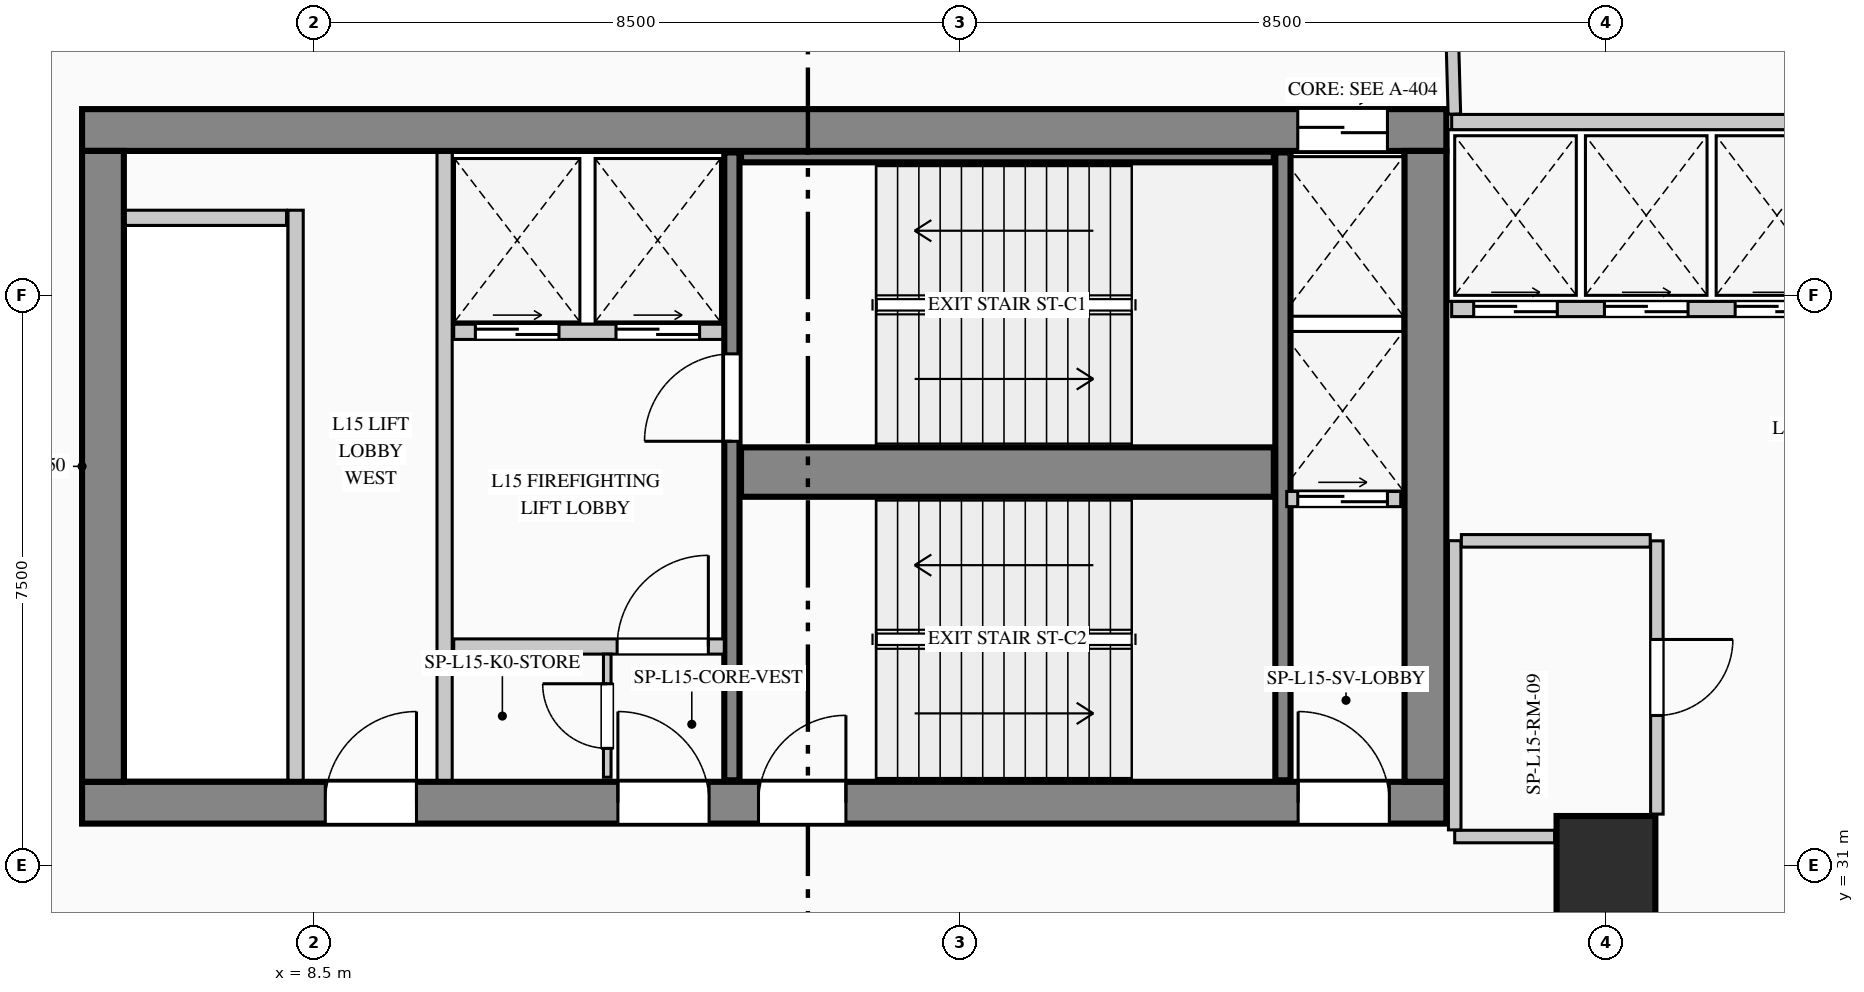
"""IFC4 building model, lengths in metres.
Left out: names, types, materials, properties, quantities, classifications, styles, units other than length and angle.
Written with IfcOpenShell. Run it as: python <this file> out.ifc"""

import sys

from ifc_helpers import new_model, si_unit, direction, frame, frame_2d, origin, origin_2d, place, context, subcontext, project, spatial, rectangle, extrude, element, fill, save


model = new_model("IFC4")
c1 = context("Model", 3, precision=1e-05, world=origin(), true_north=direction((0.0, 1.0)))
c2 = subcontext(c1, "Body", "Model", "MODEL_VIEW")
j1 = project(units=[si_unit("LENGTHUNIT", "METRE"), si_unit("PLANEANGLEUNIT", "RADIAN")], contexts=[c1])
p1 = place(None, origin())
s1 = spatial("IfcSite", under=j1, at=p1, CompositionType="ELEMENT")
p2 = place(p1, origin())
s2 = spatial("IfcBuilding", under=s1, at=p2, CompositionType="ELEMENT")
p3 = place(p2, frame((0.0, 0.0, 66.6)))
s3 = spatial("IfcBuildingStorey", under=s2, at=p3, CompositionType="ELEMENT", Elevation=66.6)
p4 = place(p3, frame((5.45, 40.675, 0.0), z_axis=(0.0, 0.0, 1.0), x_axis=(1.0, 0.0, 0.0)))
e1 = element("IfcWall", 1, at=p4, inside=s3, PredefinedType="SHEAR", context=c2, shape_type="SweptSolid", body=[
    extrude(rectangle(XDim=17.95, YDim=0.55, at=frame_2d((8.975, 0.0))), origin(), (0.0, 0.0, 1.0), 4.4),
])
p5 = place(p4, frame((15.995, 0.0, 0.0)))
e2 = element("IfcOpeningElement", 2, at=p5, cuts=e1, PredefinedType="OPENING", context=c2, shape_type="SweptSolid", body=[
    extrude(rectangle(XDim=1.18, YDim=2.25, at=frame_2d((0.59, 1.125))), frame((0.0, 0.285, 0.0), z_axis=(0.0, -1.0, 0.0), x_axis=(1.0, 0.0, 0.0)), (0.0, 0.0, 1.0), 0.57),
])
p6 = place(p3, frame((5.45, 31.825, 0.0), z_axis=(0.0, 0.0, 1.0), x_axis=(1.0, 0.0, 0.0)))
e3 = element("IfcWall", 3, at=p6, inside=s3, PredefinedType="SHEAR", context=c2, shape_type="SweptSolid", body=[
    extrude(rectangle(XDim=17.95, YDim=0.55, at=frame_2d((8.975, 0.0))), origin(), (0.0, 0.0, 1.0), 4.4),
])
p7 = place(p6, frame((3.2, 0.0, 0.0)))
e4 = element("IfcOpeningElement", 4, at=p7, cuts=e3, PredefinedType="OPENING", context=c2, shape_type="SweptSolid", body=[
    extrude(rectangle(XDim=1.2, YDim=2.2, at=frame_2d((0.6, 1.1))), frame((0.0, 0.285, 0.0), z_axis=(0.0, -1.0, 0.0), x_axis=(1.0, 0.0, 0.0)), (0.0, 0.0, 1.0), 0.57),
])
p8 = place(p6, frame((7.05, 0.0, 0.0)))
e5 = element("IfcOpeningElement", 5, at=p8, cuts=e3, PredefinedType="OPENING", context=c2, shape_type="SweptSolid", body=[
    extrude(rectangle(XDim=1.2, YDim=2.2, at=frame_2d((0.6, 1.1))), frame((0.0, 0.285, 0.0), z_axis=(0.0, -1.0, 0.0), x_axis=(1.0, 0.0, 0.0)), (0.0, 0.0, 1.0), 0.57),
])
p9 = place(p6, frame((8.9, 0.0, 0.0)))
e6 = element("IfcOpeningElement", 6, at=p9, cuts=e3, PredefinedType="OPENING", context=c2, shape_type="SweptSolid", body=[
    extrude(rectangle(XDim=1.15, YDim=2.2, at=frame_2d((0.575, 1.1))), frame((0.0, 0.285, 0.0), z_axis=(0.0, -1.0, 0.0), x_axis=(1.0, 0.0, 0.0)), (0.0, 0.0, 1.0), 0.57),
])
p10 = place(p6, frame((16.0, 0.0, 0.0)))
e7 = element("IfcOpeningElement", 7, at=p10, cuts=e3, PredefinedType="OPENING", context=c2, shape_type="SweptSolid", body=[
    extrude(rectangle(XDim=1.2, YDim=2.2, at=frame_2d((0.6, 1.1))), frame((0.0, 0.285, 0.0), z_axis=(0.0, -1.0, 0.0), x_axis=(1.0, 0.0, 0.0)), (0.0, 0.0, 1.0), 0.57),
])
for number, where, z_axis, x_axis in (
    (8, (5.725, 32.1, 0.0), (0.0, 0.0, 1.0), (0.0, 1.0, 0.0)),
    (9, (23.125, 32.1, 0.0), (0.0, 0.0, 1.0), (0.0, 1.0, 0.0)),
):
    element("IfcWall", number, at=place(p3, frame(where, z_axis=z_axis, x_axis=x_axis)), inside=s3, PredefinedType="SHEAR", context=c2, shape_type="SweptSolid", body=[
        extrude(rectangle(XDim=8.3, YDim=0.55, at=frame_2d((4.15, 0.0))), origin(), (0.0, 0.0, 1.0), 4.4),
    ])
p11 = place(p3, frame((14.0, 32.12, 0.0), z_axis=(0.0, 0.0, 1.0), x_axis=(0.0, 1.0, 0.0)))
e10 = element("IfcWall", 10, at=p11, inside=s3, PredefinedType="SHEAR", context=c2, shape_type="SweptSolid", body=[
    extrude(rectangle(XDim=8.26, YDim=0.2, at=frame_2d((4.13, 0.0))), origin(), (0.0, 0.0, 1.0), 4.4),
])
p12 = place(p11, frame((4.46, 0.0, 0.0)))
e11 = element("IfcOpeningElement", 11, at=p12, cuts=e10, PredefinedType="OPENING", context=c2, shape_type="SweptSolid", body=[
    extrude(rectangle(XDim=1.15, YDim=2.2, at=frame_2d((0.575, 1.1))), frame((0.0, 0.11, 0.0), z_axis=(0.0, -1.0, 0.0), x_axis=(1.0, 0.0, 0.0)), (0.0, 0.0, 1.0), 0.22),
])
p13 = place(p3, frame((14.12, 36.175, 0.0), z_axis=(0.0, 0.0, 1.0), x_axis=(1.0, 0.0, 0.0)))
e12 = element("IfcWall", 12, at=p13, inside=s3, PredefinedType="SHEAR", context=c2, shape_type="SweptSolid", body=[
    extrude(rectangle(XDim=7.01, YDim=0.65, at=frame_2d((3.505, 0.0))), origin(), (0.0, 0.0, 1.0), 4.4),
])
p14 = place(p3, frame((21.25, 32.12, 0.0), z_axis=(0.0, 0.0, 1.0), x_axis=(0.0, 1.0, 0.0)))
e13 = element("IfcWall", 13, at=p14, inside=s3, PredefinedType="SHEAR", context=c2, shape_type="SweptSolid", body=[
    extrude(rectangle(XDim=8.26, YDim=0.2, at=frame_2d((4.13, 0.0))), origin(), (0.0, 0.0, 1.0), 4.4),
])
p15 = place(p3, frame((14.12, 40.32, 0.0), z_axis=(0.0, 0.0, 1.0), x_axis=(1.0, 0.0, 0.0)))
e14 = element("IfcWall", 14, at=p15, inside=s3, PredefinedType="SHEAR", context=c2, shape_type="SweptSolid", body=[
    extrude(rectangle(XDim=7.01, YDim=0.14, at=frame_2d((3.505, 0.0))), origin(), (0.0, 0.0, 1.0), 4.4),
])
p16 = place(p3, frame((25.5, 31.0, 0.0), z_axis=(0.0, 0.0, 1.0), x_axis=(1.0, 0.0, 0.0)))
e15 = element("IfcColumn", 15, at=p16, inside=s3, PredefinedType="COLUMN", context=c2, shape_type="SweptSolid", body=[
    extrude(rectangle(XDim=1.3, YDim=1.3, at=origin_2d()), origin(), (0.0, 0.0, 1.0), 4.4),
])
p17 = place(p3, frame((8.523, 4.84, 0.0), z_axis=(0.0, 0.0, 1.0), x_axis=(-0.150394554312, 0.988626055712, 0.0)))
e16 = element("IfcWall", 16, at=p17, inside=s3, PredefinedType="STANDARD", context=c2, shape_type="SweptSolid", body=[
    extrude(rectangle(XDim=36.738, YDim=0.28, at=frame_2d((18.369, 0.0))), origin(), (0.0, 0.0, 1.0), 4.1),
])
p18 = place(p17, frame((22.612, 0.0, 0.9)))
e17 = element("IfcOpeningElement", 17, at=p18, cuts=e16, PredefinedType="OPENING", context=c2, shape_type="SweptSolid", body=[
    extrude(rectangle(XDim=1.8, YDim=2.1, at=frame_2d((0.9, 1.05))), frame((0.0, 0.15, 0.0), z_axis=(0.0, -1.0, 0.0), x_axis=(1.0, 0.0, 0.0)), (0.0, 0.0, 1.0), 0.3),
])
p19 = place(p3, frame((8.26, 32.12, 0.0), z_axis=(0.0, 0.0, 1.0), x_axis=(0.0, 1.0, 0.0)))
e18 = element("IfcWall", 18, at=p19, inside=s3, PredefinedType="PARTITIONING", context=c2, shape_type="SweptSolid", body=[
    extrude(rectangle(XDim=7.5, YDim=0.2, at=frame_2d((3.75, 0.0))), origin(), (0.0, 0.0, 1.0), 4.1),
])
p20 = place(p3, frame((6.02, 39.52, 0.0), z_axis=(0.0, 0.0, 1.0), x_axis=(1.0, 0.0, 0.0)))
e19 = element("IfcWall", 19, at=p20, inside=s3, PredefinedType="PARTITIONING", context=c2, shape_type="SweptSolid", body=[
    extrude(rectangle(XDim=2.12, YDim=0.2, at=frame_2d((1.06, 0.0))), origin(), (0.0, 0.0, 1.0), 4.1),
])
p21 = place(p3, frame((10.22, 32.12, 0.0), z_axis=(0.0, 0.0, 1.0), x_axis=(0.0, 1.0, 0.0)))
e20 = element("IfcWall", 20, at=p21, inside=s3, PredefinedType="PARTITIONING", context=c2, shape_type="SweptSolid", body=[
    extrude(rectangle(XDim=8.26, YDim=0.2, at=frame_2d((4.13, 0.0))), origin(), (0.0, 0.0, 1.0), 4.1),
])
p22 = place(p3, frame((10.34, 38.02, 0.0), z_axis=(0.0, 0.0, 1.0), x_axis=(1.0, 0.0, 0.0)))
e21 = element("IfcWall", 21, at=p22, inside=s3, PredefinedType="PARTITIONING", context=c2, shape_type="SweptSolid", body=[
    extrude(rectangle(XDim=3.54, YDim=0.2, at=frame_2d((1.77, 0.0))), origin(), (0.0, 0.0, 1.0), 4.1),
])
p23 = place(p22, frame((0.285, 0.0, 0.0)))
e22 = element("IfcOpeningElement", 22, at=p23, cuts=e21, PredefinedType="OPENING", context=c2, shape_type="SweptSolid", body=[
    extrude(rectangle(XDim=1.1, YDim=2.2, at=frame_2d((0.55, 1.1))), frame((0.0, 0.11, 0.0), z_axis=(0.0, -1.0, 0.0), x_axis=(1.0, 0.0, 0.0)), (0.0, 0.0, 1.0), 0.22),
])
p24 = place(p22, frame((2.135, 0.0, 0.0)))
e23 = element("IfcOpeningElement", 23, at=p24, cuts=e21, PredefinedType="OPENING", context=c2, shape_type="SweptSolid", body=[
    extrude(rectangle(XDim=1.1, YDim=2.2, at=frame_2d((0.55, 1.1))), frame((0.0, 0.11, 0.0), z_axis=(0.0, -1.0, 0.0), x_axis=(1.0, 0.0, 0.0)), (0.0, 0.0, 1.0), 0.22),
])
p25 = place(p3, frame((10.34, 33.88, 0.0), z_axis=(0.0, 0.0, 1.0), x_axis=(1.0, 0.0, 0.0)))
e24 = element("IfcWall", 24, at=p25, inside=s3, PredefinedType="PARTITIONING", context=c2, shape_type="SweptSolid", body=[
    extrude(rectangle(XDim=3.56, YDim=0.2, at=frame_2d((1.78, 0.0))), origin(), (0.0, 0.0, 1.0), 4.1),
])
p26 = place(p25, frame((2.15, 0.0, 0.0)))
e25 = element("IfcOpeningElement", 25, at=p26, cuts=e24, PredefinedType="OPENING", context=c2, shape_type="SweptSolid", body=[
    extrude(rectangle(XDim=1.2, YDim=2.2, at=frame_2d((0.6, 1.1))), frame((0.0, 0.11, 0.0), z_axis=(0.0, -1.0, 0.0), x_axis=(1.0, 0.0, 0.0)), (0.0, 0.0, 1.0), 0.22),
])
p27 = place(p3, frame((12.36, 32.16, 0.0), z_axis=(0.0, 0.0, 1.0), x_axis=(0.0, 1.0, 0.0)))
e26 = element("IfcWall", 26, at=p27, inside=s3, PredefinedType="PARTITIONING", context=c2, shape_type="SweptSolid", body=[
    extrude(rectangle(XDim=1.62, YDim=0.1, at=frame_2d((0.81, 0.0))), origin(), (0.0, 0.0, 1.0), 4.1),
])
p28 = place(p27, frame((0.38, 0.0, 0.0)))
e27 = element("IfcOpeningElement", 27, at=p28, cuts=e26, PredefinedType="OPENING", context=c2, shape_type="SweptSolid", body=[
    extrude(rectangle(XDim=0.85, YDim=2.1, at=frame_2d((0.425, 1.05))), frame((0.0, 0.06, 0.0), z_axis=(0.0, -1.0, 0.0), x_axis=(1.0, 0.0, 0.0)), (0.0, 0.0, 1.0), 0.12),
])
p29 = place(p3, frame((21.3, 35.82, 0.0), z_axis=(0.0, 0.0, 1.0), x_axis=(1.0, 0.0, 0.0)))
e28 = element("IfcWall", 28, at=p29, inside=s3, PredefinedType="PARTITIONING", context=c2, shape_type="SweptSolid", body=[
    extrude(rectangle(XDim=1.5, YDim=0.2, at=frame_2d((0.75, 0.0))), origin(), (0.0, 0.0, 1.0), 4.1),
])
p30 = place(p29, frame((0.145, 0.0, 0.0)))
e29 = element("IfcOpeningElement", 29, at=p30, cuts=e28, PredefinedType="OPENING", context=c2, shape_type="SweptSolid", body=[
    extrude(rectangle(XDim=1.18, YDim=2.25, at=frame_2d((0.59, 1.125))), frame((0.0, 0.11, 0.0), z_axis=(0.0, -1.0, 0.0), x_axis=(1.0, 0.0, 0.0)), (0.0, 0.0, 1.0), 0.22),
])
p31 = place(p3, frame((23.47, 40.78, 0.0), z_axis=(0.0, 0.0, 1.0), x_axis=(1.0, 0.0, 0.0)))
e30 = element("IfcWall", 30, at=p31, inside=s3, PredefinedType="PARTITIONING", context=c2, shape_type="SweptSolid", body=[
    extrude(rectangle(XDim=6.91, YDim=0.2, at=frame_2d((3.455, 0.0))), origin(), (0.0, 0.0, 1.0), 4.1),
])
p32 = place(p3, frame((23.47, 38.32, 0.0), z_axis=(0.0, 0.0, 1.0), x_axis=(1.0, 0.0, 0.0)))
e31 = element("IfcWall", 31, at=p32, inside=s3, PredefinedType="PARTITIONING", context=c2, shape_type="SweptSolid", body=[
    extrude(rectangle(XDim=6.79, YDim=0.2, at=frame_2d((3.395, 0.0))), origin(), (0.0, 0.0, 1.0), 4.1),
])
p33 = place(p32, frame((0.29, 0.0, 0.0)))
e32 = element("IfcOpeningElement", 32, at=p33, cuts=e31, PredefinedType="OPENING", context=c2, shape_type="SweptSolid", body=[
    extrude(rectangle(XDim=1.1, YDim=2.2, at=frame_2d((0.55, 1.1))), frame((0.0, 0.11, 0.0), z_axis=(0.0, -1.0, 0.0), x_axis=(1.0, 0.0, 0.0)), (0.0, 0.0, 1.0), 0.22),
])
p34 = place(p32, frame((2.01, 0.0, 0.0)))
e33 = element("IfcOpeningElement", 33, at=p34, cuts=e31, PredefinedType="OPENING", context=c2, shape_type="SweptSolid", body=[
    extrude(rectangle(XDim=1.1, YDim=2.2, at=frame_2d((0.55, 1.1))), frame((0.0, 0.11, 0.0), z_axis=(0.0, -1.0, 0.0), x_axis=(1.0, 0.0, 0.0)), (0.0, 0.0, 1.0), 0.22),
])
p35 = place(p32, frame((3.73, 0.0, 0.0)))
e34 = element("IfcOpeningElement", 34, at=p35, cuts=e31, PredefinedType="OPENING", context=c2, shape_type="SweptSolid", body=[
    extrude(rectangle(XDim=1.1, YDim=2.2, at=frame_2d((0.55, 1.1))), frame((0.0, 0.11, 0.0), z_axis=(0.0, -1.0, 0.0), x_axis=(1.0, 0.0, 0.0)), (0.0, 0.0, 1.0), 0.22),
])
p36 = place(p32, frame((5.45, 0.0, 0.0)))
e35 = element("IfcOpeningElement", 35, at=p36, cuts=e31, PredefinedType="OPENING", context=c2, shape_type="SweptSolid", body=[
    extrude(rectangle(XDim=1.1, YDim=2.2, at=frame_2d((0.55, 1.1))), frame((0.0, 0.11, 0.0), z_axis=(0.0, -1.0, 0.0), x_axis=(1.0, 0.0, 0.0)), (0.0, 0.0, 1.0), 0.22),
])
p37 = place(p3, frame((26.17, 35.27, 0.0), z_axis=(0.0, 0.0, 1.0), x_axis=(0.0, -1.0, 0.0)))
e36 = element("IfcWall", 36, at=p37, inside=s3, PredefinedType="PARTITIONING", context=c2, shape_type="SweptSolid", body=[
    extrude(rectangle(XDim=3.595, YDim=0.165, at=frame_2d((1.797, 0.0))), origin(), (0.0, 0.0, 1.0), 4.1),
])
p38 = place(p37, frame((1.298, 0.0, 0.0)))
e37 = element("IfcOpeningElement", 37, at=p38, cuts=e36, PredefinedType="OPENING", context=c2, shape_type="SweptSolid", body=[
    extrude(rectangle(XDim=1.0, YDim=2.15, at=frame_2d((0.5, 1.075))), frame((0.0, 0.093, 0.0), z_axis=(0.0, -1.0, 0.0), x_axis=(1.0, 0.0, 0.0)), (0.0, 0.0, 1.0), 0.185),
])
p39 = place(p3, frame((24.825, 31.38, 0.0), z_axis=(0.0, 0.0, 1.0), x_axis=(-1.0, 0.0, 0.0)))
e38 = element("IfcWall", 38, at=p39, inside=s3, PredefinedType="PARTITIONING", context=c2, shape_type="SweptSolid", body=[
    extrude(rectangle(XDim=1.315, YDim=0.165, at=frame_2d((0.657, 0.0))), origin(), (0.0, 0.0, 1.0), 4.1),
])
p40 = place(p3, frame((23.51, 31.468, 0.0), z_axis=(0.0, 0.0, 1.0), x_axis=(0.0, 1.0, 0.0)))
e39 = element("IfcWall", 39, at=p40, inside=s3, PredefinedType="PARTITIONING", context=c2, shape_type="SweptSolid", body=[
    extrude(rectangle(XDim=3.804, YDim=0.165, at=frame_2d((1.902, 0.0))), origin(), (0.0, 0.0, 1.0), 4.1),
])
p41 = place(p3, frame((23.597, 35.27, 0.0), z_axis=(0.0, 0.0, 1.0), x_axis=(1.0, 0.0, 0.0)))
e40 = element("IfcWall", 40, at=p41, inside=s3, PredefinedType="PARTITIONING", context=c2, shape_type="SweptSolid", body=[
    extrude(rectangle(XDim=2.485, YDim=0.165, at=frame_2d((1.243, 0.0))), origin(), (0.0, 0.0, 1.0), 4.1),
])
p42 = place(p3, frame((23.506, 40.885, 0.0), z_axis=(0.0, 0.0, 1.0), x_axis=(-0.027441464163, 0.999623412113, 0.0)))
e41 = element("IfcWall", 41, at=p42, inside=s3, PredefinedType="PARTITIONING", context=c2, shape_type="SweptSolid", body=[
    extrude(rectangle(XDim=2.331, YDim=0.165, at=frame_2d((1.166, 0.0))), origin(), (0.0, 0.0, 1.0), 4.1),
])
p43 = place(p7, origin())
e42 = element("IfcDoor", 42, at=p43, inside=s3, OperationType="SINGLE_SWING_RIGHT", PredefinedType="DOOR", context=c2, shape_type="SweptSolid", body=[
    extrude(rectangle(XDim=1.2, YDim=2.2, at=frame_2d((0.6, 1.1))), frame((0.0, 0.025, 0.0), z_axis=(0.0, -1.0, 0.0), x_axis=(1.0, 0.0, 0.0)), (0.0, 0.0, 1.0), 0.05),
])
fill(e4, e42)
p44 = place(p8, origin())
e43 = element("IfcDoor", 43, at=p44, inside=s3, OperationType="SINGLE_SWING_LEFT", PredefinedType="DOOR", context=c2, shape_type="SweptSolid", body=[
    extrude(rectangle(XDim=1.2, YDim=2.2, at=frame_2d((0.6, 1.1))), frame((0.0, 0.025, 0.0), z_axis=(0.0, -1.0, 0.0), x_axis=(1.0, 0.0, 0.0)), (0.0, 0.0, 1.0), 0.05),
])
fill(e5, e43)
p45 = place(p9, origin())
e44 = element("IfcDoor", 44, at=p45, inside=s3, OperationType="SINGLE_SWING_RIGHT", PredefinedType="DOOR", context=c2, shape_type="SweptSolid", body=[
    extrude(rectangle(XDim=1.15, YDim=2.2, at=frame_2d((0.575, 1.1))), frame((0.0, 0.025, 0.0), z_axis=(0.0, -1.0, 0.0), x_axis=(1.0, 0.0, 0.0)), (0.0, 0.0, 1.0), 0.05),
])
fill(e6, e44)
p46 = place(p10, origin())
e45 = element("IfcDoor", 45, at=p46, inside=s3, OperationType="SINGLE_SWING_LEFT", PredefinedType="DOOR", context=c2, shape_type="SweptSolid", body=[
    extrude(rectangle(XDim=1.2, YDim=2.2, at=frame_2d((0.6, 1.1))), frame((0.0, 0.025, 0.0), z_axis=(0.0, -1.0, 0.0), x_axis=(1.0, 0.0, 0.0)), (0.0, 0.0, 1.0), 0.05),
])
fill(e7, e45)
p47 = place(p26, origin())
e46 = element("IfcDoor", 46, at=p47, inside=s3, OperationType="SINGLE_SWING_RIGHT", PredefinedType="DOOR", context=c2, shape_type="SweptSolid", body=[
    extrude(rectangle(XDim=1.2, YDim=2.2, at=frame_2d((0.6, 1.1))), frame((0.0, 0.025, 0.0), z_axis=(0.0, -1.0, 0.0), x_axis=(1.0, 0.0, 0.0)), (0.0, 0.0, 1.0), 0.05),
])
fill(e25, e46)
p48 = place(p28, origin())
e47 = element("IfcDoor", 47, at=p48, inside=s3, OperationType="SINGLE_SWING_RIGHT", PredefinedType="DOOR", context=c2, shape_type="SweptSolid", body=[
    extrude(rectangle(XDim=0.85, YDim=2.1, at=frame_2d((0.425, 1.05))), frame((0.0, 0.025, 0.0), z_axis=(0.0, -1.0, 0.0), x_axis=(1.0, 0.0, 0.0)), (0.0, 0.0, 1.0), 0.05),
])
fill(e27, e47)
p49 = place(p12, origin())
e48 = element("IfcDoor", 48, at=p49, inside=s3, OperationType="SINGLE_SWING_LEFT", PredefinedType="DOOR", context=c2, shape_type="SweptSolid", body=[
    extrude(rectangle(XDim=1.15, YDim=2.2, at=frame_2d((0.575, 1.1))), frame((0.0, 0.025, 0.0), z_axis=(0.0, -1.0, 0.0), x_axis=(1.0, 0.0, 0.0)), (0.0, 0.0, 1.0), 0.05),
])
fill(e11, e48)
p50 = place(p23, origin())
e49 = element("IfcDoor", 49, at=p50, inside=s3, OperationType="DOUBLE_DOOR_SLIDING", PredefinedType="DOOR", context=c2, shape_type="SweptSolid", body=[
    extrude(rectangle(XDim=1.1, YDim=2.2, at=frame_2d((0.55, 1.1))), frame((0.0, 0.025, 0.0), z_axis=(0.0, -1.0, 0.0), x_axis=(1.0, 0.0, 0.0)), (0.0, 0.0, 1.0), 0.05),
])
fill(e22, e49)
p51 = place(p24, origin())
e50 = element("IfcDoor", 50, at=p51, inside=s3, OperationType="DOUBLE_DOOR_SLIDING", PredefinedType="DOOR", context=c2, shape_type="SweptSolid", body=[
    extrude(rectangle(XDim=1.1, YDim=2.2, at=frame_2d((0.55, 1.1))), frame((0.0, 0.025, 0.0), z_axis=(0.0, -1.0, 0.0), x_axis=(1.0, 0.0, 0.0)), (0.0, 0.0, 1.0), 0.05),
])
fill(e23, e50)
p52 = place(p5, origin())
e51 = element("IfcDoor", 51, at=p52, inside=s3, OperationType="DOUBLE_DOOR_SLIDING", PredefinedType="DOOR", context=c2, shape_type="SweptSolid", body=[
    extrude(rectangle(XDim=1.18, YDim=2.25, at=frame_2d((0.59, 1.125))), frame((0.0, 0.025, 0.0), z_axis=(0.0, -1.0, 0.0), x_axis=(1.0, 0.0, 0.0)), (0.0, 0.0, 1.0), 0.05),
])
fill(e2, e51)
p53 = place(p30, origin())
e52 = element("IfcDoor", 52, at=p53, inside=s3, OperationType="DOUBLE_DOOR_SLIDING", PredefinedType="DOOR", context=c2, shape_type="SweptSolid", body=[
    extrude(rectangle(XDim=1.18, YDim=2.25, at=frame_2d((0.59, 1.125))), frame((0.0, 0.025, 0.0), z_axis=(0.0, -1.0, 0.0), x_axis=(1.0, 0.0, 0.0)), (0.0, 0.0, 1.0), 0.05),
])
fill(e29, e52)
p54 = place(p33, origin())
e53 = element("IfcDoor", 53, at=p54, inside=s3, OperationType="DOUBLE_DOOR_SLIDING", PredefinedType="DOOR", context=c2, shape_type="SweptSolid", body=[
    extrude(rectangle(XDim=1.1, YDim=2.2, at=frame_2d((0.55, 1.1))), frame((0.0, 0.025, 0.0), z_axis=(0.0, -1.0, 0.0), x_axis=(1.0, 0.0, 0.0)), (0.0, 0.0, 1.0), 0.05),
])
fill(e32, e53)
p55 = place(p34, origin())
e54 = element("IfcDoor", 54, at=p55, inside=s3, OperationType="DOUBLE_DOOR_SLIDING", PredefinedType="DOOR", context=c2, shape_type="SweptSolid", body=[
    extrude(rectangle(XDim=1.1, YDim=2.2, at=frame_2d((0.55, 1.1))), frame((0.0, 0.025, 0.0), z_axis=(0.0, -1.0, 0.0), x_axis=(1.0, 0.0, 0.0)), (0.0, 0.0, 1.0), 0.05),
])
fill(e33, e54)
p56 = place(p35, origin())
e55 = element("IfcDoor", 55, at=p56, inside=s3, OperationType="DOUBLE_DOOR_SLIDING", PredefinedType="DOOR", context=c2, shape_type="SweptSolid", body=[
    extrude(rectangle(XDim=1.1, YDim=2.2, at=frame_2d((0.55, 1.1))), frame((0.0, 0.025, 0.0), z_axis=(0.0, -1.0, 0.0), x_axis=(1.0, 0.0, 0.0)), (0.0, 0.0, 1.0), 0.05),
])
fill(e34, e55)
p57 = place(p38, origin())
e56 = element("IfcDoor", 56, at=p57, inside=s3, OperationType="SINGLE_SWING_LEFT", PredefinedType="DOOR", context=c2, shape_type="SweptSolid", body=[
    extrude(rectangle(XDim=1.0, YDim=2.15, at=frame_2d((0.5, 1.075))), frame((0.0, 0.025, 0.0), z_axis=(0.0, -1.0, 0.0), x_axis=(1.0, 0.0, 0.0)), (0.0, 0.0, 1.0), 0.05),
])
fill(e37, e56)
save(model, sys.argv[1])
